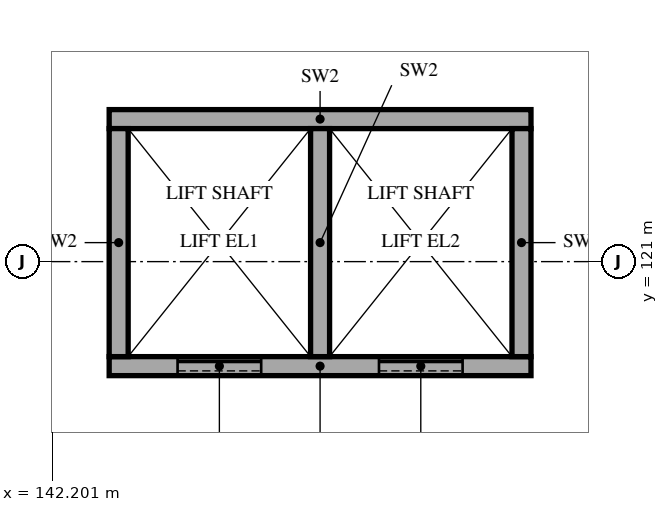
"""IFC4 building model, lengths in metres.
Left out: names, types, materials, properties, quantities, classifications, styles, units other than length and angle.
Written with IfcOpenShell. Run it as: python <this file> out.ifc"""

import sys

from ifc_helpers import new_model, si_unit, direction, frame, frame_2d, origin, place, context, subcontext, project, spatial, rectangle, extrude, element, fill, save


model = new_model("IFC4")
c1 = context("Model", 3, precision=1e-05, world=origin(), true_north=direction((0.0, 1.0)))
c2 = subcontext(c1, "Body", "Model", "MODEL_VIEW")
j1 = project(units=[si_unit("LENGTHUNIT", "METRE"), si_unit("PLANEANGLEUNIT", "RADIAN")], contexts=[c1])
p1 = place(None, origin())
s1 = spatial("IfcSite", under=j1, at=p1, CompositionType="ELEMENT")
p2 = place(p1, origin())
s2 = spatial("IfcBuilding", under=s1, at=p2, CompositionType="ELEMENT")
p3 = place(p2, frame((0.0, 0.0, -4.2)))
s3 = spatial("IfcBuildingStorey", under=s2, at=p3, CompositionType="ELEMENT", Elevation=-4.2)
p4 = place(p3, frame((142.95, 119.625, 0.0), z_axis=(0.0, 0.0, 1.0), x_axis=(1.0, 0.0, 0.0)))
e1 = element("IfcWall", 1, at=p4, inside=s3, PredefinedType="SHEAR", context=c2, shape_type="SweptSolid", body=[
    extrude(rectangle(XDim=5.55, YDim=0.25, at=frame_2d((2.775, 0.0))), origin(), (0.0, 0.0, 1.0), 4.2),
])
p5 = place(p4, frame((0.9, 0.0, 0.0)))
e2 = element("IfcOpeningElement", 2, at=p5, cuts=e1, PredefinedType="OPENING", context=c2, shape_type="SweptSolid", body=[
    extrude(rectangle(XDim=1.1, YDim=2.1, at=frame_2d((0.55, 1.05))), frame((0.0, 0.135, 0.0), z_axis=(0.0, -1.0, 0.0), x_axis=(1.0, 0.0, 0.0)), (0.0, 0.0, 1.0), 0.27),
])
p6 = place(p4, frame((3.55, 0.0, 0.0)))
e3 = element("IfcOpeningElement", 3, at=p6, cuts=e1, PredefinedType="OPENING", context=c2, shape_type="SweptSolid", body=[
    extrude(rectangle(XDim=1.1, YDim=2.1, at=frame_2d((0.55, 1.05))), frame((0.0, 0.135, 0.0), z_axis=(0.0, -1.0, 0.0), x_axis=(1.0, 0.0, 0.0)), (0.0, 0.0, 1.0), 0.27),
])
p7 = place(p3, frame((142.95, 122.875, 0.0), z_axis=(0.0, 0.0, 1.0), x_axis=(1.0, 0.0, 0.0)))
e4 = element("IfcWall", 4, at=p7, inside=s3, PredefinedType="SHEAR", context=c2, shape_type="SweptSolid", body=[
    extrude(rectangle(XDim=5.55, YDim=0.25, at=frame_2d((2.775, 0.0))), origin(), (0.0, 0.0, 1.0), 4.2),
])
for number, where, z_axis, x_axis in (
    (5, (143.075, 119.75, 0.0), (0.0, 0.0, 1.0), (0.0, 1.0, 0.0)),
    (6, (148.375, 119.75, 0.0), (0.0, 0.0, 1.0), (0.0, 1.0, 0.0)),
    (7, (145.725, 119.75, 0.0), (0.0, 0.0, 1.0), (0.0, 1.0, 0.0)),
):
    element("IfcWall", number, at=place(p3, frame(where, z_axis=z_axis, x_axis=x_axis)), inside=s3, PredefinedType="SHEAR", context=c2, shape_type="SweptSolid", body=[
        extrude(rectangle(XDim=3.0, YDim=0.25, at=frame_2d((1.5, 0.0))), origin(), (0.0, 0.0, 1.0), 4.2),
    ])
p8 = place(p5, origin())
e8 = element("IfcDoor", 8, at=p8, inside=s3, OperationType="DOUBLE_DOOR_SLIDING", PredefinedType="NOTDEFINED", context=c2, shape_type="SweptSolid", body=[
    extrude(rectangle(XDim=1.1, YDim=2.1, at=frame_2d((0.55, 1.05))), frame((0.0, 0.025, 0.0), z_axis=(0.0, -1.0, 0.0), x_axis=(1.0, 0.0, 0.0)), (0.0, 0.0, 1.0), 0.05),
])
fill(e2, e8)
p9 = place(p6, origin())
e9 = element("IfcDoor", 9, at=p9, inside=s3, OperationType="DOUBLE_DOOR_SLIDING", PredefinedType="NOTDEFINED", context=c2, shape_type="SweptSolid", body=[
    extrude(rectangle(XDim=1.1, YDim=2.1, at=frame_2d((0.55, 1.05))), frame((0.0, 0.025, 0.0), z_axis=(0.0, -1.0, 0.0), x_axis=(1.0, 0.0, 0.0)), (0.0, 0.0, 1.0), 0.05),
])
fill(e3, e9)
save(model, sys.argv[1])
